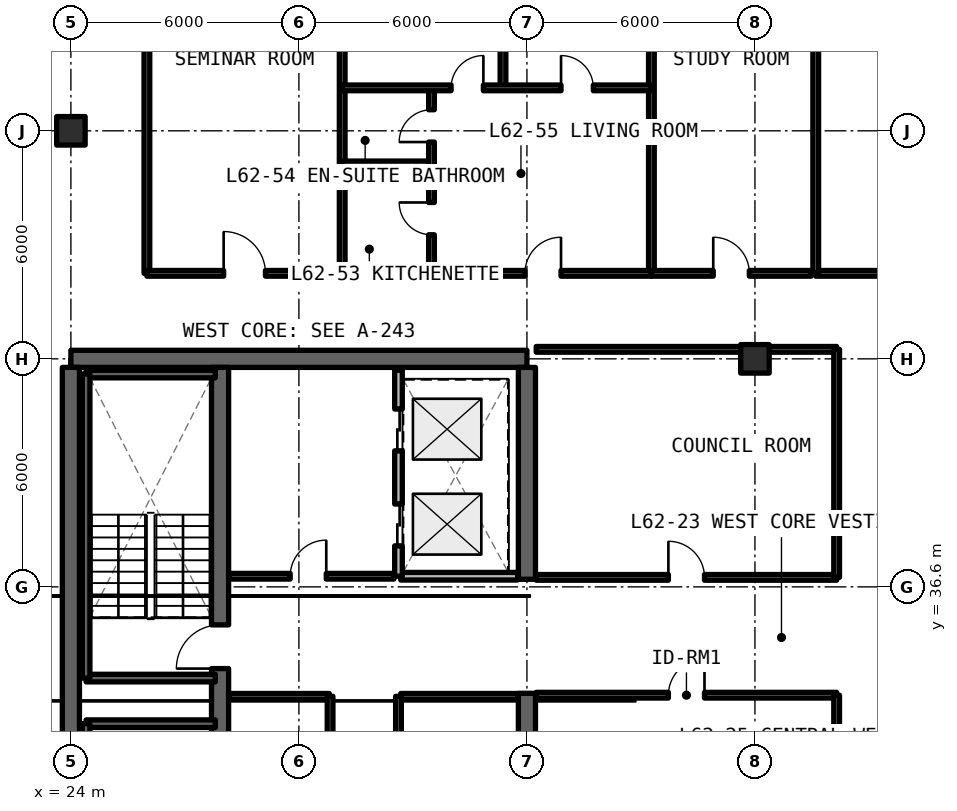
"""IFC4 building model, lengths in metres.
Left out: names, types, materials, properties, quantities, classifications, styles, units other than length and angle.
Written with IfcOpenShell. Run it as: python <this file> out.ifc"""

import sys

from ifc_helpers import new_model, si_unit, direction, frame, frame_2d, origin, origin_2d, place, context, subcontext, project, spatial, rectangle, extrude, element, fill, save


model = new_model("IFC4")
c1 = context("Model", 3, precision=1e-05, world=origin(), true_north=direction((0.0, 1.0)))
c2 = subcontext(c1, "Body", "Model", "MODEL_VIEW")
j1 = project(units=[si_unit("LENGTHUNIT", "METRE"), si_unit("PLANEANGLEUNIT", "RADIAN")], contexts=[c1])
p1 = place(None, origin())
s1 = spatial("IfcSite", under=j1, at=p1, CompositionType="ELEMENT")
p2 = place(p1, origin())
s2 = spatial("IfcBuilding", under=s1, at=p2, CompositionType="ELEMENT")
p3 = place(p2, frame((0.0, 0.0, 222.75)))
s3 = spatial("IfcBuildingStorey", under=s2, at=p3, CompositionType="ELEMENT", Elevation=222.75)
p4 = place(p3, frame((36.0, 42.6, 0.0), z_axis=(0.0, 0.0, 1.0), x_axis=(-1.0, 0.0, 0.0)))
e1 = element("IfcWall", 1, at=p4, inside=s3, PredefinedType="SHEAR", context=c2, shape_type="SweptSolid", body=[
    extrude(rectangle(XDim=12.0, YDim=0.45, at=frame_2d((6.0, 0.0))), origin(), (0.0, 0.0, 1.0), 3.3),
])
p5 = place(p3, frame((24.0, 24.825, 0.0), z_axis=(0.0, 0.0, 1.0), x_axis=(0.0, 1.0, 0.0)))
e2 = element("IfcWall", 2, at=p5, inside=s3, PredefinedType="SHEAR", context=c2, shape_type="SweptSolid", body=[
    extrude(rectangle(XDim=17.55, YDim=0.45, at=frame_2d((8.775, 0.0))), origin(), (0.0, 0.0, 1.0), 3.3),
])
p6 = place(p3, frame((36.0, 24.825, 0.0), z_axis=(0.0, 0.0, 1.0), x_axis=(0.0, 1.0, 0.0)))
e3 = element("IfcWall", 3, at=p6, inside=s3, PredefinedType="SHEAR", context=c2, shape_type="SweptSolid", body=[
    extrude(rectangle(XDim=8.975, YDim=0.45, at=frame_2d((4.488, 0.0))), origin(), (0.0, 0.0, 1.0), 3.3),
])
p7 = place(p3, frame((36.0, 36.8, 0.0), z_axis=(0.0, 0.0, 1.0), x_axis=(0.0, 1.0, 0.0)))
e4 = element("IfcWall", 4, at=p7, inside=s3, PredefinedType="SHEAR", context=c2, shape_type="SweptSolid", body=[
    extrude(rectangle(XDim=5.575, YDim=0.45, at=frame_2d((2.788, 0.0))), origin(), (0.0, 0.0, 1.0), 3.3),
])
p8 = place(p3, frame((27.925, 24.825, 0.0), z_axis=(0.0, 0.0, 1.0), x_axis=(0.0, 1.0, 0.0)))
e5 = element("IfcWall", 5, at=p8, inside=s3, PredefinedType="SHEAR", context=c2, shape_type="SweptSolid", body=[
    extrude(rectangle(XDim=17.55, YDim=0.45, at=frame_2d((8.775, 0.0))), origin(), (0.0, 0.0, 1.0), 3.3),
])
p9 = place(p8, frame((0.425, 0.0, 0.0)))
e6 = element("IfcOpeningElement", 6, at=p9, cuts=e5, PredefinedType="OPENING", context=c2, shape_type="SweptSolid", body=[
    extrude(rectangle(XDim=1.15, YDim=2.15, at=frame_2d((0.575, 1.075))), frame((0.0, 0.235, 0.0), z_axis=(0.0, -1.0, 0.0), x_axis=(1.0, 0.0, 0.0)), (0.0, 0.0, 1.0), 0.47),
])
p10 = place(p8, frame((9.625, 0.0, 0.0)))
e7 = element("IfcOpeningElement", 7, at=p10, cuts=e5, PredefinedType="OPENING", context=c2, shape_type="SweptSolid", body=[
    extrude(rectangle(XDim=1.15, YDim=2.15, at=frame_2d((0.575, 1.075))), frame((0.0, 0.235, 0.0), z_axis=(0.0, -1.0, 0.0), x_axis=(1.0, 0.0, 0.0)), (0.0, 0.0, 1.0), 0.47),
])
for number, where, z_axis, x_axis in (
    (8, (42.0, 42.6, 0.0), (0.0, 0.0, 1.0), (1.0, 0.0, 0.0)),
    (9, (24.0, 48.6, 0.0), (0.0, 0.0, 1.0), (1.0, 0.0, 0.0)),
):
    element("IfcColumn", number, at=place(p3, frame(where, z_axis=z_axis, x_axis=x_axis)), inside=s3, PredefinedType="COLUMN", context=c2, shape_type="SweptSolid", body=[
        extrude(rectangle(XDim=0.75, YDim=0.75, at=origin_2d()), origin(), (0.0, 0.0, 1.0), 3.3),
    ])
p11 = place(p3, frame((28.17, 33.72, 0.0), z_axis=(0.0, 0.0, 1.0), x_axis=(1.0, 0.0, 0.0)))
e10 = element("IfcWall", 10, at=p11, inside=s3, PredefinedType="SOLIDWALL", context=c2, shape_type="SweptSolid", body=[
    extrude(rectangle(XDim=2.63, YDim=0.15, at=frame_2d((1.315, 0.0))), origin(), (0.0, 0.0, 1.0), 2.35),
])
p12 = place(p3, frame((30.82, 28.5, 0.0), z_axis=(0.0, 0.0, 1.0), x_axis=(0.0, 1.0, 0.0)))
e11 = element("IfcWall", 11, at=p12, inside=s3, PredefinedType="SOLIDWALL", context=c2, shape_type="SweptSolid", body=[
    extrude(rectangle(XDim=5.22, YDim=0.15, at=frame_2d((2.61, 0.0))), origin(), (0.0, 0.0, 1.0), 2.35),
])
p13 = place(p12, frame((2.1, 0.0, 0.0)))
e12 = element("IfcOpeningElement", 12, at=p13, cuts=e11, PredefinedType="OPENING", context=c2, shape_type="SweptSolid", body=[
    extrude(rectangle(XDim=0.95, YDim=2.15, at=frame_2d((0.475, 1.075))), frame((0.0, 0.085, 0.0), z_axis=(0.0, -1.0, 0.0), x_axis=(1.0, 0.0, 0.0)), (0.0, 0.0, 1.0), 0.17),
])
p14 = place(p3, frame((32.68, 33.72, 0.0), z_axis=(0.0, 0.0, 1.0), x_axis=(1.0, 0.0, 0.0)))
e13 = element("IfcWall", 13, at=p14, inside=s3, PredefinedType="SOLIDWALL", context=c2, shape_type="SweptSolid", body=[
    extrude(rectangle(XDim=3.075, YDim=0.15, at=frame_2d((1.538, 0.0))), origin(), (0.0, 0.0, 1.0), 2.35),
])
p15 = place(p3, frame((32.62, 28.5, 0.0), z_axis=(0.0, 0.0, 1.0), x_axis=(0.0, 1.0, 0.0)))
e14 = element("IfcWall", 14, at=p15, inside=s3, PredefinedType="SOLIDWALL", context=c2, shape_type="SweptSolid", body=[
    extrude(rectangle(XDim=5.22, YDim=0.15, at=frame_2d((2.61, 0.0))), origin(), (0.0, 0.0, 1.0), 2.35),
])
p16 = place(p15, frame((2.0, 0.0, 0.0)))
e15 = element("IfcOpeningElement", 15, at=p16, cuts=e14, PredefinedType="OPENING", context=c2, shape_type="SweptSolid", body=[
    extrude(rectangle(XDim=0.95, YDim=2.15, at=frame_2d((0.475, 1.075))), frame((0.0, 0.085, 0.0), z_axis=(0.0, -1.0, 0.0), x_axis=(1.0, 0.0, 0.0)), (0.0, 0.0, 1.0), 0.17),
])
p17 = place(p3, frame((28.17, 36.88, 0.0), z_axis=(0.0, 0.0, 1.0), x_axis=(1.0, 0.0, 0.0)))
e16 = element("IfcWall", 16, at=p17, inside=s3, PredefinedType="SOLIDWALL", context=c2, shape_type="SweptSolid", body=[
    extrude(rectangle(XDim=4.33, YDim=0.15, at=frame_2d((2.165, 0.0))), origin(), (0.0, 0.0, 1.0), 2.35),
])
p18 = place(p17, frame((1.6, 0.0, 0.0)))
e17 = element("IfcOpeningElement", 17, at=p18, cuts=e16, PredefinedType="OPENING", context=c2, shape_type="SweptSolid", body=[
    extrude(rectangle(XDim=0.95, YDim=2.15, at=frame_2d((0.475, 1.075))), frame((0.0, 0.085, 0.0), z_axis=(0.0, -1.0, 0.0), x_axis=(1.0, 0.0, 0.0)), (0.0, 0.0, 1.0), 0.17),
])
p19 = place(p3, frame((32.68, 36.88, 0.0), z_axis=(0.0, 0.0, 1.0), x_axis=(1.0, 0.0, 0.0)))
e18 = element("IfcWall", 18, at=p19, inside=s3, PredefinedType="SOLIDWALL", context=c2, shape_type="SweptSolid", body=[
    extrude(rectangle(XDim=3.075, YDim=0.2, at=frame_2d((1.538, 0.0))), origin(), (0.0, 0.0, 1.0), 2.35),
])
p20 = place(p3, frame((32.62, 36.88, 0.0), z_axis=(0.0, 0.0, 1.0), x_axis=(0.0, 1.0, 0.0)))
e19 = element("IfcWall", 19, at=p20, inside=s3, PredefinedType="SOLIDWALL", context=c2, shape_type="SweptSolid", body=[
    extrude(rectangle(XDim=5.42, YDim=0.2, at=frame_2d((2.71, 0.0))), origin(), (0.0, 0.0, 1.0), 2.35),
])
p21 = place(p20, frame((0.8, 0.0, 0.0)))
e20 = element("IfcOpeningElement", 20, at=p21, cuts=e19, PredefinedType="OPENING", context=c2, shape_type="SweptSolid", body=[
    extrude(rectangle(XDim=1.1, YDim=2.2, at=frame_2d((0.55, 1.1))), frame((0.0, 0.11, 0.0), z_axis=(0.0, -1.0, 0.0), x_axis=(1.0, 0.0, 0.0)), (0.0, 0.0, 1.0), 0.22),
])
p22 = place(p20, frame((3.3, 0.0, 0.0)))
e21 = element("IfcOpeningElement", 21, at=p22, cuts=e19, PredefinedType="OPENING", context=c2, shape_type="SweptSolid", body=[
    extrude(rectangle(XDim=1.1, YDim=2.2, at=frame_2d((0.55, 1.1))), frame((0.0, 0.11, 0.0), z_axis=(0.0, -1.0, 0.0), x_axis=(1.0, 0.0, 0.0)), (0.0, 0.0, 1.0), 0.22),
])
p23 = place(p3, frame((36.245, 33.75, 0.0), z_axis=(0.0, 0.0, 1.0), x_axis=(1.0, 0.0, 0.0)))
e22 = element("IfcWall", 22, at=p23, inside=s3, PredefinedType="SOLIDWALL", context=c2, shape_type="SweptSolid", body=[
    extrude(rectangle(XDim=7.905, YDim=0.15, at=frame_2d((3.952, 0.0))), origin(), (0.0, 0.0, 1.0), 2.35),
])
p24 = place(p23, frame((3.478, 0.0, 0.0)))
e23 = element("IfcOpeningElement", 23, at=p24, cuts=e22, PredefinedType="OPENING", context=c2, shape_type="SweptSolid", body=[
    extrude(rectangle(XDim=0.95, YDim=2.15, at=frame_2d((0.475, 1.075))), frame((0.0, 0.085, 0.0), z_axis=(0.0, -1.0, 0.0), x_axis=(1.0, 0.0, 0.0)), (0.0, 0.0, 1.0), 0.17),
])
p25 = place(p3, frame((44.15, 24.35, 0.0), z_axis=(0.0, 0.0, 1.0), x_axis=(0.0, 1.0, 0.0)))
e24 = element("IfcWall", 24, at=p25, inside=s3, PredefinedType="SOLIDWALL", context=c2, shape_type="SweptSolid", body=[
    extrude(rectangle(XDim=9.4, YDim=0.15, at=frame_2d((4.7, 0.0))), origin(), (0.0, 0.0, 1.0), 2.35),
])
p26 = place(p3, frame((36.245, 36.85, 0.0), z_axis=(0.0, 0.0, 1.0), x_axis=(1.0, 0.0, 0.0)))
e25 = element("IfcWall", 25, at=p26, inside=s3, PredefinedType="SOLIDWALL", context=c2, shape_type="SweptSolid", body=[
    extrude(rectangle(XDim=7.905, YDim=0.15, at=frame_2d((3.952, 0.0))), origin(), (0.0, 0.0, 1.0), 2.35),
])
p27 = place(p26, frame((3.478, 0.0, 0.0)))
e26 = element("IfcOpeningElement", 26, at=p27, cuts=e25, PredefinedType="OPENING", context=c2, shape_type="SweptSolid", body=[
    extrude(rectangle(XDim=0.95, YDim=2.15, at=frame_2d((0.475, 1.075))), frame((0.0, 0.085, 0.0), z_axis=(0.0, -1.0, 0.0), x_axis=(1.0, 0.0, 0.0)), (0.0, 0.0, 1.0), 0.17),
])
p28 = place(p3, frame((36.245, 42.85, 0.0), z_axis=(0.0, 0.0, 1.0), x_axis=(1.0, 0.0, 0.0)))
e27 = element("IfcWall", 27, at=p28, inside=s3, PredefinedType="SOLIDWALL", context=c2, shape_type="SweptSolid", body=[
    extrude(rectangle(XDim=7.905, YDim=0.15, at=frame_2d((3.952, 0.0))), origin(), (0.0, 0.0, 1.0), 2.35),
])
p29 = place(p3, frame((44.15, 36.85, 0.0), z_axis=(0.0, 0.0, 1.0), x_axis=(0.0, 1.0, 0.0)))
e28 = element("IfcWall", 28, at=p29, inside=s3, PredefinedType="SOLIDWALL", context=c2, shape_type="SweptSolid", body=[
    extrude(rectangle(XDim=6.0, YDim=0.15, at=frame_2d((3.0, 0.0))), origin(), (0.0, 0.0, 1.0), 2.35),
])
p30 = place(p3, frame((43.6, 44.85, 0.0), z_axis=(0.0, 0.0, 1.0), x_axis=(1.0, 0.0, 0.0)))
e29 = element("IfcWall", 29, at=p30, inside=s3, PredefinedType="SOLIDWALL", context=c2, shape_type="SweptSolid", body=[
    extrude(rectangle(XDim=8.4, YDim=0.15, at=frame_2d((4.2, 0.0))), origin(), (0.0, 0.0, 1.0), 2.35),
])
p31 = place(p30, frame((3.65, 0.0, 0.0)))
e30 = element("IfcOpeningElement", 30, at=p31, cuts=e29, PredefinedType="OPENING", context=c2, shape_type="SweptSolid", body=[
    extrude(rectangle(XDim=1.1, YDim=2.15, at=frame_2d((0.55, 1.075))), frame((0.0, 0.085, 0.0), z_axis=(0.0, -1.0, 0.0), x_axis=(1.0, 0.0, 0.0)), (0.0, 0.0, 1.0), 0.17),
])
for number, where, z_axis, x_axis in (
    (31, (43.6, 44.85, 0.0), (0.0, 0.0, 1.0), (0.0, 1.0, 0.0)),
    (32, (26.0, 44.85, 0.0), (0.0, 0.0, 1.0), (0.0, 1.0, 0.0)),
    (33, (31.139, 44.85, 0.0), (0.0, 0.0, 1.0), (0.0, 1.0, 0.0)),
):
    element("IfcWall", number, at=place(p3, frame(where, z_axis=z_axis, x_axis=x_axis)), inside=s3, PredefinedType="SOLIDWALL", context=c2, shape_type="SweptSolid", body=[
        extrude(rectangle(XDim=10.08, YDim=0.15, at=frame_2d((5.04, 0.0))), origin(), (0.0, 0.0, 1.0), 2.35),
    ])
p32 = place(p3, frame((26.0, 44.85, 0.0), z_axis=(0.0, 0.0, 1.0), x_axis=(1.0, 0.0, 0.0)))
e34 = element("IfcWall", 34, at=p32, inside=s3, PredefinedType="SOLIDWALL", context=c2, shape_type="SweptSolid", body=[
    extrude(rectangle(XDim=5.139, YDim=0.15, at=frame_2d((2.569, 0.0))), origin(), (0.0, 0.0, 1.0), 2.35),
])
p33 = place(p32, frame((2.019, 0.0, 0.0)))
e35 = element("IfcOpeningElement", 35, at=p33, cuts=e34, PredefinedType="OPENING", context=c2, shape_type="SweptSolid", body=[
    extrude(rectangle(XDim=1.1, YDim=2.15, at=frame_2d((0.55, 1.075))), frame((0.0, 0.085, 0.0), z_axis=(0.0, -1.0, 0.0), x_axis=(1.0, 0.0, 0.0)), (0.0, 0.0, 1.0), 0.17),
])
p34 = place(p3, frame((39.275, 44.85, 0.0), z_axis=(0.0, 0.0, 1.0), x_axis=(0.0, 1.0, 0.0)))
e36 = element("IfcWall", 36, at=p34, inside=s3, PredefinedType="SOLIDWALL", context=c2, shape_type="SweptSolid", body=[
    extrude(rectangle(XDim=10.08, YDim=0.15, at=frame_2d((5.04, 0.0))), origin(), (0.0, 0.0, 1.0), 2.35),
])
p35 = place(p3, frame((31.139, 47.729, 0.0), z_axis=(0.0, 0.0, 1.0), x_axis=(1.0, 0.0, 0.0)))
e37 = element("IfcWall", 37, at=p35, inside=s3, PredefinedType="PARTITIONING", context=c2, shape_type="SweptSolid", body=[
    extrude(rectangle(XDim=2.35, YDim=0.15, at=frame_2d((1.175, 0.0))), origin(), (0.0, 0.0, 1.0), 2.35),
])
p36 = place(p3, frame((33.489, 44.85, 0.0), z_axis=(0.0, 0.0, 1.0), x_axis=(0.0, 1.0, 0.0)))
e38 = element("IfcWall", 38, at=p36, inside=s3, PredefinedType="PARTITIONING", context=c2, shape_type="SweptSolid", body=[
    extrude(rectangle(XDim=4.88, YDim=0.15, at=frame_2d((2.44, 0.0))), origin(), (0.0, 0.0, 1.0), 2.35),
])
p37 = place(p36, frame((1.015, 0.0, 0.0)))
e39 = element("IfcOpeningElement", 39, at=p37, cuts=e38, PredefinedType="OPENING", context=c2, shape_type="SweptSolid", body=[
    extrude(rectangle(XDim=0.85, YDim=2.1, at=frame_2d((0.425, 1.05))), frame((0.0, 0.085, 0.0), z_axis=(0.0, -1.0, 0.0), x_axis=(1.0, 0.0, 0.0)), (0.0, 0.0, 1.0), 0.17),
])
p38 = place(p36, frame((3.455, 0.0, 0.0)))
e40 = element("IfcOpeningElement", 40, at=p38, cuts=e38, PredefinedType="OPENING", context=c2, shape_type="SweptSolid", body=[
    extrude(rectangle(XDim=0.85, YDim=2.1, at=frame_2d((0.425, 1.05))), frame((0.0, 0.085, 0.0), z_axis=(0.0, -1.0, 0.0), x_axis=(1.0, 0.0, 0.0)), (0.0, 0.0, 1.0), 0.17),
])
p39 = place(p3, frame((35.37, 49.73, 0.0), z_axis=(0.0, 0.0, 1.0), x_axis=(0.0, 1.0, 0.0)))
e41 = element("IfcWall", 41, at=p39, inside=s3, PredefinedType="PARTITIONING", context=c2, shape_type="SweptSolid", body=[
    extrude(rectangle(XDim=5.2, YDim=0.15, at=frame_2d((2.6, 0.0))), origin(), (0.0, 0.0, 1.0), 2.35),
])
p40 = place(p3, frame((31.139, 49.73, 0.0), z_axis=(0.0, 0.0, 1.0), x_axis=(1.0, 0.0, 0.0)))
e42 = element("IfcWall", 42, at=p40, inside=s3, PredefinedType="PARTITIONING", context=c2, shape_type="SweptSolid", body=[
    extrude(rectangle(XDim=8.136, YDim=0.15, at=frame_2d((4.068, 0.0))), origin(), (0.0, 0.0, 1.0), 2.35),
])
p41 = place(p40, frame((2.865, 0.0, 0.0)))
e43 = element("IfcOpeningElement", 43, at=p41, cuts=e42, PredefinedType="OPENING", context=c2, shape_type="SweptSolid", body=[
    extrude(rectangle(XDim=0.85, YDim=2.1, at=frame_2d((0.425, 1.05))), frame((0.0, 0.085, 0.0), z_axis=(0.0, -1.0, 0.0), x_axis=(1.0, 0.0, 0.0)), (0.0, 0.0, 1.0), 0.17),
])
p42 = place(p40, frame((5.759, 0.0, 0.0)))
e44 = element("IfcOpeningElement", 44, at=p42, cuts=e42, PredefinedType="OPENING", context=c2, shape_type="SweptSolid", body=[
    extrude(rectangle(XDim=0.85, YDim=2.1, at=frame_2d((0.425, 1.05))), frame((0.0, 0.085, 0.0), z_axis=(0.0, -1.0, 0.0), x_axis=(1.0, 0.0, 0.0)), (0.0, 0.0, 1.0), 0.17),
])
p43 = place(p3, frame((31.139, 44.85, 0.0), z_axis=(0.0, 0.0, 1.0), x_axis=(1.0, 0.0, 0.0)))
e45 = element("IfcWall", 45, at=p43, inside=s3, PredefinedType="SOLIDWALL", context=c2, shape_type="SweptSolid", body=[
    extrude(rectangle(XDim=8.136, YDim=0.15, at=frame_2d((4.068, 0.0))), origin(), (0.0, 0.0, 1.0), 2.35),
])
p44 = place(p43, frame((4.808, 0.0, 0.0)))
e46 = element("IfcOpeningElement", 46, at=p44, cuts=e45, PredefinedType="OPENING", context=c2, shape_type="SweptSolid", body=[
    extrude(rectangle(XDim=0.95, YDim=2.15, at=frame_2d((0.475, 1.075))), frame((0.0, 0.085, 0.0), z_axis=(0.0, -1.0, 0.0), x_axis=(1.0, 0.0, 0.0)), (0.0, 0.0, 1.0), 0.17),
])
p45 = place(p3, frame((39.275, 44.85, 0.0), z_axis=(0.0, 0.0, 1.0), x_axis=(1.0, 0.0, 0.0)))
e47 = element("IfcWall", 47, at=p45, inside=s3, PredefinedType="SOLIDWALL", context=c2, shape_type="SweptSolid", body=[
    extrude(rectangle(XDim=4.205, YDim=0.15, at=frame_2d((2.102, 0.0))), origin(), (0.0, 0.0, 1.0), 2.35),
])
p46 = place(p45, frame((1.627, 0.0, 0.0)))
e48 = element("IfcOpeningElement", 48, at=p46, cuts=e47, PredefinedType="OPENING", context=c2, shape_type="SweptSolid", body=[
    extrude(rectangle(XDim=0.95, YDim=2.15, at=frame_2d((0.475, 1.075))), frame((0.0, 0.085, 0.0), z_axis=(0.0, -1.0, 0.0), x_axis=(1.0, 0.0, 0.0)), (0.0, 0.0, 1.0), 0.17),
])
p47 = place(p3, frame((27.8, 33.0, 0.0), z_axis=(0.0, 0.0, 1.0), x_axis=(-1.0, 0.0, 0.0)))
e49 = element("IfcWall", 49, at=p47, inside=s3, PredefinedType="SOLIDWALL", context=c2, shape_type="SweptSolid", body=[
    extrude(rectangle(XDim=3.4, YDim=0.2, at=frame_2d((1.7, 0.0))), origin(), (0.0, 0.0, 1.0), 3.3),
])
p48 = place(p3, frame((24.4, 33.0, 0.0), z_axis=(0.0, 0.0, 1.0), x_axis=(0.0, -1.0, 0.0)))
e50 = element("IfcWall", 50, at=p48, inside=s3, PredefinedType="SOLIDWALL", context=c2, shape_type="SweptSolid", body=[
    extrude(rectangle(XDim=8.0, YDim=0.2, at=frame_2d((4.0, 0.0))), origin(), (0.0, 0.0, 1.0), 3.3),
])
for number, where, z_axis, x_axis in (
    (51, (24.4, 34.2, 0.0), (0.0, 0.0, 1.0), (1.0, 0.0, 0.0)),
    (52, (27.8, 42.2, 0.0), (0.0, 0.0, 1.0), (-1.0, 0.0, 0.0)),
):
    element("IfcWall", number, at=place(p3, frame(where, z_axis=z_axis, x_axis=x_axis)), inside=s3, PredefinedType="SOLIDWALL", context=c2, shape_type="SweptSolid", body=[
        extrude(rectangle(XDim=3.4, YDim=0.2, at=frame_2d((1.7, 0.0))), origin(), (0.0, 0.0, 1.0), 3.3),
    ])
p49 = place(p3, frame((24.4, 42.2, 0.0), z_axis=(0.0, 0.0, 1.0), x_axis=(0.0, -1.0, 0.0)))
e53 = element("IfcWall", 53, at=p49, inside=s3, PredefinedType="SOLIDWALL", context=c2, shape_type="SweptSolid", body=[
    extrude(rectangle(XDim=8.0, YDim=0.2, at=frame_2d((4.0, 0.0))), origin(), (0.0, 0.0, 1.0), 3.3),
])
p50 = place(p18, origin())
e54 = element("IfcDoor", 54, at=p50, inside=s3, OperationType="SINGLE_SWING_RIGHT", PredefinedType="DOOR", context=c2, shape_type="SweptSolid", body=[
    extrude(rectangle(XDim=0.95, YDim=2.15, at=frame_2d((0.475, 1.075))), frame((0.0, 0.025, 0.0), z_axis=(0.0, -1.0, 0.0), x_axis=(1.0, 0.0, 0.0)), (0.0, 0.0, 1.0), 0.05),
])
fill(e17, e54)
p51 = place(p21, origin())
e55 = element("IfcDoor", 55, at=p51, inside=s3, OperationType="SLIDING_TO_LEFT", PredefinedType="DOOR", context=c2, shape_type="SweptSolid", body=[
    extrude(rectangle(XDim=1.1, YDim=2.2, at=frame_2d((0.55, 1.1))), frame((0.0, 0.025, 0.0), z_axis=(0.0, -1.0, 0.0), x_axis=(1.0, 0.0, 0.0)), (0.0, 0.0, 1.0), 0.05),
])
fill(e20, e55)
p52 = place(p22, origin())
e56 = element("IfcDoor", 56, at=p52, inside=s3, OperationType="SLIDING_TO_RIGHT", PredefinedType="DOOR", context=c2, shape_type="SweptSolid", body=[
    extrude(rectangle(XDim=1.1, YDim=2.2, at=frame_2d((0.55, 1.1))), frame((0.0, 0.025, 0.0), z_axis=(0.0, -1.0, 0.0), x_axis=(1.0, 0.0, 0.0)), (0.0, 0.0, 1.0), 0.05),
])
fill(e21, e56)
p53 = place(p24, origin())
e57 = element("IfcDoor", 57, at=p53, inside=s3, OperationType="SINGLE_SWING_RIGHT", PredefinedType="DOOR", context=c2, shape_type="SweptSolid", body=[
    extrude(rectangle(XDim=0.95, YDim=2.15, at=frame_2d((0.475, 1.075))), frame((0.0, 0.025, 0.0), z_axis=(0.0, -1.0, 0.0), x_axis=(1.0, 0.0, 0.0)), (0.0, 0.0, 1.0), 0.05),
])
fill(e23, e57)
p54 = place(p27, origin())
e58 = element("IfcDoor", 58, at=p54, inside=s3, OperationType="SINGLE_SWING_LEFT", PredefinedType="DOOR", context=c2, shape_type="SweptSolid", body=[
    extrude(rectangle(XDim=0.95, YDim=2.15, at=frame_2d((0.475, 1.075))), frame((0.0, 0.025, 0.0), z_axis=(0.0, -1.0, 0.0), x_axis=(1.0, 0.0, 0.0)), (0.0, 0.0, 1.0), 0.05),
])
fill(e26, e58)
p55 = place(p33, origin())
e59 = element("IfcDoor", 59, at=p55, inside=s3, OperationType="SINGLE_SWING_LEFT", PredefinedType="DOOR", context=c2, shape_type="SweptSolid", body=[
    extrude(rectangle(XDim=1.1, YDim=2.15, at=frame_2d((0.55, 1.075))), frame((0.0, 0.025, 0.0), z_axis=(0.0, -1.0, 0.0), x_axis=(1.0, 0.0, 0.0)), (0.0, 0.0, 1.0), 0.05),
])
fill(e35, e59)
p56 = place(p37, origin())
e60 = element("IfcDoor", 60, at=p56, inside=s3, OperationType="SINGLE_SWING_RIGHT", PredefinedType="DOOR", context=c2, shape_type="SweptSolid", body=[
    extrude(rectangle(XDim=0.85, YDim=2.1, at=frame_2d((0.425, 1.05))), frame((0.0, 0.025, 0.0), z_axis=(0.0, -1.0, 0.0), x_axis=(1.0, 0.0, 0.0)), (0.0, 0.0, 1.0), 0.05),
])
fill(e39, e60)
p57 = place(p38, origin())
e61 = element("IfcDoor", 61, at=p57, inside=s3, OperationType="SINGLE_SWING_LEFT", PredefinedType="DOOR", context=c2, shape_type="SweptSolid", body=[
    extrude(rectangle(XDim=0.85, YDim=2.1, at=frame_2d((0.425, 1.05))), frame((0.0, 0.025, 0.0), z_axis=(0.0, -1.0, 0.0), x_axis=(1.0, 0.0, 0.0)), (0.0, 0.0, 1.0), 0.05),
])
fill(e40, e61)
p58 = place(p41, origin())
e62 = element("IfcDoor", 62, at=p58, inside=s3, OperationType="SINGLE_SWING_RIGHT", PredefinedType="DOOR", context=c2, shape_type="SweptSolid", body=[
    extrude(rectangle(XDim=0.85, YDim=2.1, at=frame_2d((0.425, 1.05))), frame((0.0, 0.025, 0.0), z_axis=(0.0, -1.0, 0.0), x_axis=(1.0, 0.0, 0.0)), (0.0, 0.0, 1.0), 0.05),
])
fill(e43, e62)
p59 = place(p42, origin())
e63 = element("IfcDoor", 63, at=p59, inside=s3, OperationType="SINGLE_SWING_LEFT", PredefinedType="DOOR", context=c2, shape_type="SweptSolid", body=[
    extrude(rectangle(XDim=0.85, YDim=2.1, at=frame_2d((0.425, 1.05))), frame((0.0, 0.025, 0.0), z_axis=(0.0, -1.0, 0.0), x_axis=(1.0, 0.0, 0.0)), (0.0, 0.0, 1.0), 0.05),
])
fill(e44, e63)
p60 = place(p44, origin())
e64 = element("IfcDoor", 64, at=p60, inside=s3, OperationType="SINGLE_SWING_RIGHT", PredefinedType="DOOR", context=c2, shape_type="SweptSolid", body=[
    extrude(rectangle(XDim=0.95, YDim=2.15, at=frame_2d((0.475, 1.075))), frame((0.0, 0.025, 0.0), z_axis=(0.0, -1.0, 0.0), x_axis=(1.0, 0.0, 0.0)), (0.0, 0.0, 1.0), 0.05),
])
fill(e46, e64)
p61 = place(p46, origin())
e65 = element("IfcDoor", 65, at=p61, inside=s3, OperationType="SINGLE_SWING_LEFT", PredefinedType="DOOR", context=c2, shape_type="SweptSolid", body=[
    extrude(rectangle(XDim=0.95, YDim=2.15, at=frame_2d((0.475, 1.075))), frame((0.0, 0.025, 0.0), z_axis=(0.0, -1.0, 0.0), x_axis=(1.0, 0.0, 0.0)), (0.0, 0.0, 1.0), 0.05),
])
fill(e48, e65)
p62 = place(p10, origin())
e66 = element("IfcDoor", 66, at=p62, inside=s3, OperationType="SINGLE_SWING_LEFT", PredefinedType="DOOR", context=c2, shape_type="SweptSolid", body=[
    extrude(rectangle(XDim=1.15, YDim=2.15, at=frame_2d((0.575, 1.075))), frame((0.0, 0.025, 0.0), z_axis=(0.0, -1.0, 0.0), x_axis=(1.0, 0.0, 0.0)), (0.0, 0.0, 1.0), 0.05),
])
fill(e7, e66)
save(model, sys.argv[1])
